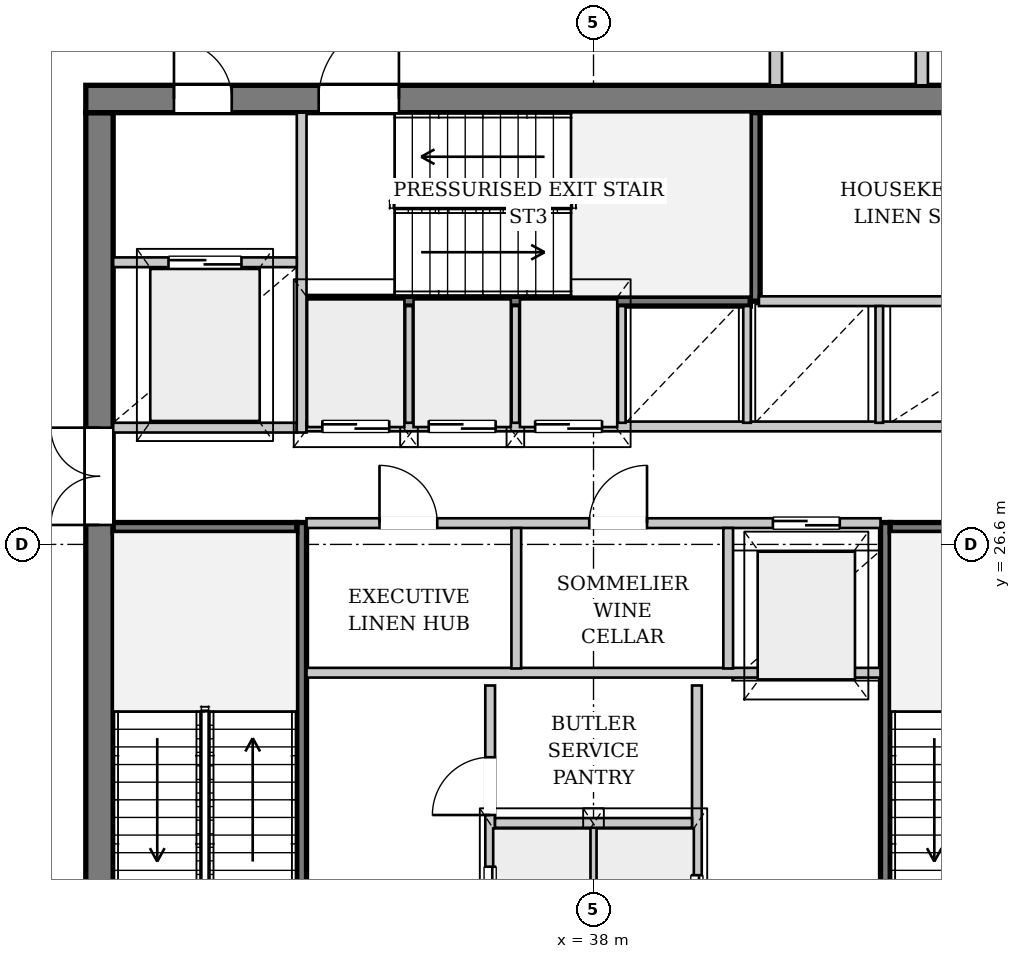
"""IFC4 building model, lengths in metres.
Left out: names, types, materials, properties, quantities, classifications, styles, units other than length and angle.
Written with IfcOpenShell. Run it as: python <this file> out.ifc"""

import sys

from ifc_helpers import new_model, si_unit, direction, frame, frame_2d, origin, place, context, subcontext, project, spatial, rectangle, extrude, source, transform, mapped, element, fill, save


model = new_model("IFC4")
c1 = context("Model", 3, precision=1e-05, world=origin(), true_north=direction((0.0, 1.0)))
c2 = subcontext(c1, "Body", "Model", "MODEL_VIEW")
j1 = project(units=[si_unit("LENGTHUNIT", "METRE"), si_unit("PLANEANGLEUNIT", "RADIAN")], contexts=[c1])
p1 = place(None, origin())
s1 = spatial("IfcSite", under=j1, at=p1, CompositionType="ELEMENT")
p2 = place(p1, origin())
s2 = spatial("IfcBuilding", under=s1, at=p2, CompositionType="ELEMENT")
p3 = place(p2, frame((0.0, 0.0, 216.7)))
s3 = spatial("IfcBuildingStorey", under=s2, at=p3, CompositionType="ELEMENT", Elevation=216.7)
p4 = place(p3, frame((52.937, 23.49, 0.0), z_axis=(0.0, 0.0, 1.0), x_axis=(-0.479001143565, -0.877814276748, 0.0)))
e1 = element("IfcWall", 1, at=p4, inside=s3, PredefinedType="SOLIDWALL", context=c2, shape_type="SweptSolid", body=[
    extrude(rectangle(XDim=23.072, YDim=0.32, at=frame_2d((11.536, 0.0))), origin(), (0.0, 0.0, 1.0), 2.822),
])
p5 = place(p4, frame((6.633, 0.0, 0.0)))
e2 = element("IfcOpeningElement", 2, at=p5, cuts=e1, PredefinedType="OPENING", context=c2, shape_type="SweptSolid", body=[
    extrude(rectangle(XDim=1.5, YDim=2.3, at=frame_2d((0.75, 1.15))), frame((0.0, 0.17, 0.0), z_axis=(0.0, -1.0, 0.0), x_axis=(1.0, 0.0, 0.0)), (0.0, 0.0, 1.0), 0.34),
])
p6 = place(p4, frame((15.773, 0.0, 0.352)))
e3 = element("IfcOpeningElement", 3, at=p6, cuts=e1, PredefinedType="OPENING", context=c2, shape_type="SweptSolid", body=[
    extrude(rectangle(XDim=2.6, YDim=2.35, at=frame_2d((1.3, 1.175))), frame((0.0, 0.17, 0.0), z_axis=(0.0, -1.0, 0.0), x_axis=(1.0, 0.0, 0.0)), (0.0, 0.0, 1.0), 0.34),
])
p7 = place(p3, frame((15.72, 32.197, 0.0), z_axis=(0.0, 0.0, 1.0), x_axis=(0.899012313214, 0.437923350246, 0.0)))
e4 = element("IfcWall", 4, at=p7, inside=s3, PredefinedType="SOLIDWALL", context=c2, shape_type="SweptSolid", body=[
    extrude(rectangle(XDim=22.511, YDim=0.38, at=frame_2d((11.256, 0.0))), origin(), (0.0, 0.0, 1.0), 2.822),
])
p8 = place(p7, frame((5.653, 0.0, 0.452)))
e5 = element("IfcOpeningElement", 5, at=p8, cuts=e4, PredefinedType="OPENING", context=c2, shape_type="SweptSolid", body=[
    extrude(rectangle(XDim=2.2, YDim=2.25, at=frame_2d((1.1, 1.125))), frame((0.0, 0.2, 0.0), z_axis=(0.0, -1.0, 0.0), x_axis=(1.0, 0.0, 0.0)), (0.0, 0.0, 1.0), 0.4),
])
p9 = place(p7, frame((15.108, 0.0, 0.452)))
e6 = element("IfcOpeningElement", 6, at=p9, cuts=e4, PredefinedType="OPENING", context=c2, shape_type="SweptSolid", body=[
    extrude(rectangle(XDim=2.2, YDim=2.25, at=frame_2d((1.1, 1.125))), frame((0.0, 0.2, 0.0), z_axis=(0.0, -1.0, 0.0), x_axis=(1.0, 0.0, 0.0)), (0.0, 0.0, 1.0), 0.4),
])
p10 = place(p3, frame((43.092, 3.473, 0.0), z_axis=(0.0, 0.0, 1.0), x_axis=(0.473808636285, 0.880627830688, 0.0)))
e7 = element("IfcWall", 7, at=p10, inside=s3, PredefinedType="PARAPET", context=c2, shape_type="SweptSolid", body=[
    extrude(rectangle(XDim=20.551, YDim=0.22, at=frame_2d((10.275, 0.0))), origin(), (0.0, 0.0, 1.0), 0.3),
])
p11 = place(p3, frame((29.875, 19.5, 0.0), z_axis=(0.0, 0.0, 1.0), x_axis=(0.0, 1.0, 0.0)))
e8 = element("IfcWall", 8, at=p11, inside=s3, PredefinedType="SHEAR", context=c2, shape_type="SweptSolid", body=[
    extrude(rectangle(XDim=14.2, YDim=0.45, at=frame_2d((7.1, 0.0))), origin(), (0.0, 0.0, 1.0), 3.33),
])
p12 = place(p11, frame((7.42, 0.0, 0.0)))
e9 = element("IfcOpeningElement", 9, at=p12, cuts=e8, PredefinedType="OPENING", context=c2, shape_type="SweptSolid", body=[
    extrude(rectangle(XDim=1.6, YDim=2.2, at=frame_2d((0.8, 1.1))), frame((0.0, 0.235, 0.0), z_axis=(0.0, -1.0, 0.0), x_axis=(1.0, 0.0, 0.0)), (0.0, 0.0, 1.0), 0.47),
])
p13 = place(p3, frame((29.65, 33.925, 0.0), z_axis=(0.0, 0.0, 1.0), x_axis=(1.0, 0.0, 0.0)))
e10 = element("IfcWall", 10, at=p13, inside=s3, PredefinedType="SHEAR", context=c2, shape_type="SweptSolid", body=[
    extrude(rectangle(XDim=16.7, YDim=0.45, at=frame_2d((8.35, 0.0))), origin(), (0.0, 0.0, 1.0), 3.33),
])
p14 = place(p13, frame((1.45, 0.0, 0.0)))
e11 = element("IfcOpeningElement", 11, at=p14, cuts=e10, PredefinedType="OPENING", context=c2, shape_type="SweptSolid", body=[
    extrude(rectangle(XDim=0.95, YDim=2.1, at=frame_2d((0.475, 1.05))), frame((0.0, 0.235, 0.0), z_axis=(0.0, -1.0, 0.0), x_axis=(1.0, 0.0, 0.0)), (0.0, 0.0, 1.0), 0.47),
])
p15 = place(p13, frame((3.83, 0.0, 0.0)))
e12 = element("IfcOpeningElement", 12, at=p15, cuts=e10, PredefinedType="OPENING", context=c2, shape_type="SweptSolid", body=[
    extrude(rectangle(XDim=1.32, YDim=2.2, at=frame_2d((0.66, 1.1))), frame((0.0, 0.235, 0.0), z_axis=(0.0, -1.0, 0.0), x_axis=(1.0, 0.0, 0.0)), (0.0, 0.0, 1.0), 0.47),
])
p16 = place(p3, frame((33.2, 19.5, 0.0), z_axis=(0.0, 0.0, 1.0), x_axis=(0.0, 1.0, 0.0)))
e13 = element("IfcWall", 13, at=p16, inside=s3, PredefinedType="PARTITIONING", context=c2, shape_type="SweptSolid", body=[
    extrude(rectangle(XDim=7.46, YDim=0.16, at=frame_2d((3.73, 0.0))), origin(), (0.0, 0.0, 1.0), 3.33),
])
p17 = place(p16, frame((0.08, 0.0, 0.0)))
e14 = element("IfcOpeningElement", 14, at=p17, cuts=e13, PredefinedType="OPENING", context=c2, shape_type="SweptSolid", body=[
    extrude(rectangle(XDim=1.32, YDim=2.2, at=frame_2d((0.66, 1.1))), frame((0.0, 0.09, 0.0), z_axis=(0.0, -1.0, 0.0), x_axis=(1.0, 0.0, 0.0)), (0.0, 0.0, 1.0), 0.18),
])
p18 = place(p3, frame((30.1, 26.88, 0.0), z_axis=(0.0, 0.0, 1.0), x_axis=(1.0, 0.0, 0.0)))
e15 = element("IfcWall", 15, at=p18, inside=s3, PredefinedType="PARTITIONING", context=c2, shape_type="SweptSolid", body=[
    extrude(rectangle(XDim=3.02, YDim=0.16, at=frame_2d((1.51, 0.0))), origin(), (0.0, 0.0, 1.0), 3.33),
])
p19 = place(p3, frame((42.8, 26.96, 0.0), z_axis=(0.0, 0.0, 1.0), x_axis=(0.0, -1.0, 0.0)))
e16 = element("IfcWall", 16, at=p19, inside=s3, PredefinedType="PARTITIONING", context=c2, shape_type="SweptSolid", body=[
    extrude(rectangle(XDim=7.46, YDim=0.16, at=frame_2d((3.73, 0.0))), origin(), (0.0, 0.0, 1.0), 3.33),
])
p20 = place(p19, frame((6.06, 0.0, 0.0)))
e17 = element("IfcOpeningElement", 17, at=p20, cuts=e16, PredefinedType="OPENING", context=c2, shape_type="SweptSolid", body=[
    extrude(rectangle(XDim=1.32, YDim=2.2, at=frame_2d((0.66, 1.1))), frame((0.0, 0.09, 0.0), z_axis=(0.0, -1.0, 0.0), x_axis=(1.0, 0.0, 0.0)), (0.0, 0.0, 1.0), 0.18),
])
p21 = place(p3, frame((42.88, 26.88, 0.0), z_axis=(0.0, 0.0, 1.0), x_axis=(1.0, 0.0, 0.0)))
e18 = element("IfcWall", 18, at=p21, inside=s3, PredefinedType="PARTITIONING", context=c2, shape_type="SweptSolid", body=[
    extrude(rectangle(XDim=3.02, YDim=0.16, at=frame_2d((1.51, 0.0))), origin(), (0.0, 0.0, 1.0), 3.33),
])
p22 = place(p3, frame((33.28, 30.6, 0.0), z_axis=(0.0, 0.0, 1.0), x_axis=(1.0, 0.0, 0.0)))
e19 = element("IfcWall", 19, at=p22, inside=s3, PredefinedType="PARTITIONING", context=c2, shape_type="SweptSolid", body=[
    extrude(rectangle(XDim=7.3, YDim=0.16, at=frame_2d((3.65, 0.0))), origin(), (0.0, 0.0, 1.0), 3.33),
])
p23 = place(p3, frame((40.66, 30.6, 0.0), z_axis=(0.0, 0.0, 1.0), x_axis=(0.0, 1.0, 0.0)))
e20 = element("IfcWall", 20, at=p23, inside=s3, PredefinedType="PARTITIONING", context=c2, shape_type="SweptSolid", body=[
    extrude(rectangle(XDim=3.1, YDim=0.16, at=frame_2d((1.55, 0.0))), origin(), (0.0, 0.0, 1.0), 3.33),
])
p24 = place(p3, frame((36.3, 19.5, 0.0), z_axis=(0.0, 0.0, 1.0), x_axis=(0.0, 1.0, 0.0)))
e21 = element("IfcWall", 21, at=p24, inside=s3, PredefinedType="PARTITIONING", context=c2, shape_type="SweptSolid", body=[
    extrude(rectangle(XDim=4.78, YDim=0.16, at=frame_2d((2.39, 0.0))), origin(), (0.0, 0.0, 1.0), 3.33),
])
p25 = place(p24, frame((0.6, 0.0, 0.0)))
e22 = element("IfcOpeningElement", 22, at=p25, cuts=e21, PredefinedType="OPENING", context=c2, shape_type="SweptSolid", body=[
    extrude(rectangle(XDim=1.2, YDim=2.2, at=frame_2d((0.6, 1.1))), frame((0.0, 0.09, 0.0), z_axis=(0.0, -1.0, 0.0), x_axis=(1.0, 0.0, 0.0)), (0.0, 0.0, 1.0), 0.18),
])
p26 = place(p24, frame((2.65, 0.0, 0.0)))
e23 = element("IfcOpeningElement", 23, at=p26, cuts=e21, PredefinedType="OPENING", context=c2, shape_type="SweptSolid", body=[
    extrude(rectangle(XDim=0.95, YDim=2.1, at=frame_2d((0.475, 1.05))), frame((0.0, 0.09, 0.0), z_axis=(0.0, -1.0, 0.0), x_axis=(1.0, 0.0, 0.0)), (0.0, 0.0, 1.0), 0.18),
])
p27 = place(p3, frame((39.7, 24.28, 0.0), z_axis=(0.0, 0.0, 1.0), x_axis=(0.0, -1.0, 0.0)))
e24 = element("IfcWall", 24, at=p27, inside=s3, PredefinedType="PARTITIONING", context=c2, shape_type="SweptSolid", body=[
    extrude(rectangle(XDim=4.78, YDim=0.16, at=frame_2d((2.39, 0.0))), origin(), (0.0, 0.0, 1.0), 3.33),
])
p28 = place(p27, frame((3.12, 0.0, 0.0)))
e25 = element("IfcOpeningElement", 25, at=p28, cuts=e24, PredefinedType="OPENING", context=c2, shape_type="SweptSolid", body=[
    extrude(rectangle(XDim=1.2, YDim=2.2, at=frame_2d((0.6, 1.1))), frame((0.0, 0.09, 0.0), z_axis=(0.0, -1.0, 0.0), x_axis=(1.0, 0.0, 0.0)), (0.0, 0.0, 1.0), 0.18),
])
p29 = place(p3, frame((38.0, 19.5, 0.0), z_axis=(0.0, 0.0, 1.0), x_axis=(0.0, 1.0, 0.0)))
e26 = element("IfcWall", 26, at=p29, inside=s3, PredefinedType="PARTITIONING", context=c2, shape_type="SweptSolid", body=[
    extrude(rectangle(XDim=2.46, YDim=0.125, at=frame_2d((1.23, 0.0))), origin(), (0.0, 0.0, 1.0), 3.33),
])
p30 = place(p3, frame((36.38, 22.02, 0.0), z_axis=(0.0, 0.0, 1.0), x_axis=(1.0, 0.0, 0.0)))
e27 = element("IfcWall", 27, at=p30, inside=s3, PredefinedType="PARTITIONING", context=c2, shape_type="SweptSolid", body=[
    extrude(rectangle(XDim=3.24, YDim=0.16, at=frame_2d((1.62, 0.0))), origin(), (0.0, 0.0, 1.0), 3.33),
])
p31 = place(p3, frame((33.28, 24.49, 0.0), z_axis=(0.0, 0.0, 1.0), x_axis=(1.0, 0.0, 0.0)))
e28 = element("IfcWall", 28, at=p31, inside=s3, PredefinedType="PARTITIONING", context=c2, shape_type="SweptSolid", body=[
    extrude(rectangle(XDim=9.44, YDim=0.16, at=frame_2d((4.72, 0.0))), origin(), (0.0, 0.0, 1.0), 3.33),
])
p32 = place(p3, frame((30.1, 28.52, 0.0), z_axis=(0.0, 0.0, 1.0), x_axis=(1.0, 0.0, 0.0)))
e29 = element("IfcWall", 29, at=p32, inside=s3, PredefinedType="PARTITIONING", context=c2, shape_type="SweptSolid", body=[
    extrude(rectangle(XDim=3.02, YDim=0.16, at=frame_2d((1.51, 0.0))), origin(), (0.0, 0.0, 1.0), 3.33),
])
p33 = place(p3, frame((33.2, 28.44, 0.0), z_axis=(0.0, 0.0, 1.0), x_axis=(0.0, 1.0, 0.0)))
e30 = element("IfcWall", 30, at=p33, inside=s3, PredefinedType="PARTITIONING", context=c2, shape_type="SweptSolid", body=[
    extrude(rectangle(XDim=5.26, YDim=0.16, at=frame_2d((2.63, 0.0))), origin(), (0.0, 0.0, 1.0), 3.33),
])
p34 = place(p3, frame((30.1, 31.24, 0.0), z_axis=(0.0, 0.0, 1.0), x_axis=(1.0, 0.0, 0.0)))
e31 = element("IfcWall", 31, at=p34, inside=s3, PredefinedType="PARTITIONING", context=c2, shape_type="SweptSolid", body=[
    extrude(rectangle(XDim=3.02, YDim=0.16, at=frame_2d((1.51, 0.0))), origin(), (0.0, 0.0, 1.0), 3.33),
])
p35 = place(p34, frame((0.91, 0.0, 0.0)))
e32 = element("IfcOpeningElement", 32, at=p35, cuts=e31, PredefinedType="OPENING", context=c2, shape_type="SweptSolid", body=[
    extrude(rectangle(XDim=1.2, YDim=2.2, at=frame_2d((0.6, 1.1))), frame((0.0, 0.09, 0.0), z_axis=(0.0, -1.0, 0.0), x_axis=(1.0, 0.0, 0.0)), (0.0, 0.0, 1.0), 0.18),
])
p36 = place(p3, frame((33.28, 26.95, 0.0), z_axis=(0.0, 0.0, 1.0), x_axis=(1.0, 0.0, 0.0)))
e33 = element("IfcWall", 33, at=p36, inside=s3, PredefinedType="PARTITIONING", context=c2, shape_type="SweptSolid", body=[
    extrude(rectangle(XDim=9.44, YDim=0.16, at=frame_2d((4.72, 0.0))), origin(), (0.0, 0.0, 1.0), 3.33),
])
p37 = place(p36, frame((1.2, 0.0, 0.0)))
e34 = element("IfcOpeningElement", 34, at=p37, cuts=e33, PredefinedType="OPENING", context=c2, shape_type="SweptSolid", body=[
    extrude(rectangle(XDim=0.95, YDim=2.1, at=frame_2d((0.475, 1.05))), frame((0.0, 0.09, 0.0), z_axis=(0.0, -1.0, 0.0), x_axis=(1.0, 0.0, 0.0)), (0.0, 0.0, 1.0), 0.18),
])
p38 = place(p36, frame((4.65, 0.0, 0.0)))
e35 = element("IfcOpeningElement", 35, at=p38, cuts=e33, PredefinedType="OPENING", context=c2, shape_type="SweptSolid", body=[
    extrude(rectangle(XDim=0.95, YDim=2.1, at=frame_2d((0.475, 1.05))), frame((0.0, 0.09, 0.0), z_axis=(0.0, -1.0, 0.0), x_axis=(1.0, 0.0, 0.0)), (0.0, 0.0, 1.0), 0.18),
])
p39 = place(p36, frame((7.67, 0.0, 0.0)))
e36 = element("IfcOpeningElement", 36, at=p39, cuts=e33, PredefinedType="OPENING", context=c2, shape_type="SweptSolid", body=[
    extrude(rectangle(XDim=1.1, YDim=2.2, at=frame_2d((0.55, 1.1))), frame((0.0, 0.09, 0.0), z_axis=(0.0, -1.0, 0.0), x_axis=(1.0, 0.0, 0.0)), (0.0, 0.0, 1.0), 0.18),
])
for number, where, z_axis, x_axis in (
    (37, (36.73, 24.56, 0.0), (0.0, 0.0, 1.0), (0.0, 1.0, 0.0)),
    (38, (40.215, 24.56, 0.0), (0.0, 0.0, 1.0), (0.0, 1.0, 0.0)),
):
    element("IfcWall", number, at=place(p3, frame(where, z_axis=z_axis, x_axis=x_axis)), inside=s3, PredefinedType="PARTITIONING", context=c2, shape_type="SweptSolid", body=[
        extrude(rectangle(XDim=2.31, YDim=0.16, at=frame_2d((1.155, 0.0))), origin(), (0.0, 0.0, 1.0), 3.33),
    ])
p40 = place(p3, frame((33.28, 28.54, 0.0), z_axis=(0.0, 0.0, 1.0), x_axis=(1.0, 0.0, 0.0)))
e39 = element("IfcWall", 39, at=p40, inside=s3, PredefinedType="PARTITIONING", context=c2, shape_type="SweptSolid", body=[
    extrude(rectangle(XDim=12.62, YDim=0.16, at=frame_2d((6.31, 0.0))), origin(), (0.0, 0.0, 1.0), 3.33),
])
p41 = place(p40, frame((0.26, 0.0, 0.0)))
e40 = element("IfcOpeningElement", 40, at=p41, cuts=e39, PredefinedType="OPENING", context=c2, shape_type="SweptSolid", body=[
    extrude(rectangle(XDim=1.1, YDim=2.2, at=frame_2d((0.55, 1.1))), frame((0.0, 0.09, 0.0), z_axis=(0.0, -1.0, 0.0), x_axis=(1.0, 0.0, 0.0)), (0.0, 0.0, 1.0), 0.18),
])
p42 = place(p40, frame((2.01, 0.0, 0.0)))
e41 = element("IfcOpeningElement", 41, at=p42, cuts=e39, PredefinedType="OPENING", context=c2, shape_type="SweptSolid", body=[
    extrude(rectangle(XDim=1.1, YDim=2.2, at=frame_2d((0.55, 1.1))), frame((0.0, 0.09, 0.0), z_axis=(0.0, -1.0, 0.0), x_axis=(1.0, 0.0, 0.0)), (0.0, 0.0, 1.0), 0.18),
])
p43 = place(p40, frame((3.76, 0.0, 0.0)))
e42 = element("IfcOpeningElement", 42, at=p43, cuts=e39, PredefinedType="OPENING", context=c2, shape_type="SweptSolid", body=[
    extrude(rectangle(XDim=1.1, YDim=2.2, at=frame_2d((0.55, 1.1))), frame((0.0, 0.09, 0.0), z_axis=(0.0, -1.0, 0.0), x_axis=(1.0, 0.0, 0.0)), (0.0, 0.0, 1.0), 0.18),
])
p44 = place(p3, frame((40.72, 30.6, 0.0), z_axis=(0.0, 0.0, 1.0), x_axis=(1.0, 0.0, 0.0)))
e43 = element("IfcWall", 43, at=p44, inside=s3, PredefinedType="PARTITIONING", context=c2, shape_type="SweptSolid", body=[
    extrude(rectangle(XDim=5.18, YDim=0.16, at=frame_2d((2.59, 0.0))), origin(), (0.0, 0.0, 1.0), 3.33),
])
for number, where, z_axis, x_axis in (
    (44, (34.965, 28.6, 0.0), (0.0, 0.0, 1.0), (0.0, 1.0, 0.0)),
    (45, (36.715, 28.6, 0.0), (0.0, 0.0, 1.0), (0.0, 1.0, 0.0)),
    (46, (38.465, 28.6, 0.0), (0.0, 0.0, 1.0), (0.0, 1.0, 0.0)),
    (47, (40.525, 28.6, 0.0), (0.0, 0.0, 1.0), (0.0, 1.0, 0.0)),
    (48, (42.7, 28.6, 0.0), (0.0, 0.0, 1.0), (0.0, 1.0, 0.0)),
):
    element("IfcWall", number, at=place(p3, frame(where, z_axis=z_axis, x_axis=x_axis)), inside=s3, PredefinedType="PARTITIONING", context=c2, shape_type="SweptSolid", body=[
        extrude(rectangle(XDim=1.92, YDim=0.125, at=frame_2d((0.96, 0.0))), origin(), (0.0, 0.0, 1.0), 3.33),
    ])
for number, where, z_axis, x_axis in (
    (49, (41.0, 34.15, 0.0), (0.0, 0.0, 1.0), (0.0, 1.0, 0.0)),
    (50, (43.4, 34.15, 0.0), (0.0, 0.0, 1.0), (0.0, 1.0, 0.0)),
):
    element("IfcWall", number, at=place(p3, frame(where, z_axis=z_axis, x_axis=x_axis)), inside=s3, PredefinedType="PARTITIONING", context=c2, shape_type="SweptSolid", body=[
        extrude(rectangle(XDim=1.85, YDim=0.2, at=frame_2d((0.925, 0.0))), origin(), (0.0, 0.0, 1.0), 3.33),
    ])
m1 = source(origin(), c2, "Body", "SweptSolid", [
    extrude(rectangle(XDim=1.6, YDim=2.2, at=frame_2d((0.8, 1.1))), frame((0.0, 0.025, 0.0), z_axis=(0.0, -1.0, 0.0), x_axis=(1.0, 0.0, 0.0)), (0.0, 0.0, 1.0), 0.05),
])
p45 = place(p12, origin())
e51 = element("IfcDoor", 51, at=p45, inside=s3, OperationType="DOUBLE_DOOR_SINGLE_SWING", PredefinedType="DOOR", context=c2, shape_type="MappedRepresentation", body=[
    mapped(m1, transform((0.0, 0.0, 0.0), x_axis=(1.0, 0.0, 0.0), y_axis=(0.0, 1.0, 0.0), z_axis=(0.0, 0.0, 1.0), scale=1.0)),
])
fill(e9, e51)
m2 = source(origin(), c2, "Body", "SweptSolid", [
    extrude(rectangle(XDim=0.95, YDim=2.1, at=frame_2d((0.475, 1.05))), frame((0.0, 0.025, 0.0), z_axis=(0.0, -1.0, 0.0), x_axis=(1.0, 0.0, 0.0)), (0.0, 0.0, 1.0), 0.05),
])
p46 = place(p14, origin())
e52 = element("IfcDoor", 52, at=p46, inside=s3, OperationType="SINGLE_SWING_LEFT", PredefinedType="DOOR", context=c2, shape_type="MappedRepresentation", body=[
    mapped(m2, transform((0.0, 0.0, 0.0), x_axis=(1.0, 0.0, 0.0), y_axis=(0.0, 1.0, 0.0), z_axis=(0.0, 0.0, 1.0), scale=1.0)),
])
fill(e11, e52)
m3 = source(origin(), c2, "Body", "SweptSolid", [
    extrude(rectangle(XDim=1.32, YDim=2.2, at=frame_2d((0.66, 1.1))), frame((0.0, 0.025, 0.0), z_axis=(0.0, -1.0, 0.0), x_axis=(1.0, 0.0, 0.0)), (0.0, 0.0, 1.0), 0.05),
])
p47 = place(p15, origin())
e53 = element("IfcDoor", 53, at=p47, inside=s3, OperationType="SINGLE_SWING_RIGHT", PredefinedType="DOOR", context=c2, shape_type="MappedRepresentation", body=[
    mapped(m3, transform((0.0, 0.0, 0.0), x_axis=(1.0, 0.0, 0.0), y_axis=(0.0, 1.0, 0.0), z_axis=(0.0, 0.0, 1.0), scale=1.0)),
])
fill(e12, e53)
m4 = source(origin(), c2, "Body", "SweptSolid", [
    extrude(rectangle(XDim=1.2, YDim=2.2, at=frame_2d((0.6, 1.1))), frame((0.0, 0.025, 0.0), z_axis=(0.0, -1.0, 0.0), x_axis=(1.0, 0.0, 0.0)), (0.0, 0.0, 1.0), 0.05),
])
p48 = place(p25, origin())
e54 = element("IfcDoor", 54, at=p48, inside=s3, OperationType="DOUBLE_DOOR_SLIDING", PredefinedType="DOOR", context=c2, shape_type="MappedRepresentation", body=[
    mapped(m4, transform((0.0, 0.0, 0.0), x_axis=(1.0, 0.0, 0.0), y_axis=(0.0, 1.0, 0.0), z_axis=(0.0, 0.0, 1.0), scale=1.0)),
])
fill(e22, e54)
p49 = place(p26, origin())
e55 = element("IfcDoor", 55, at=p49, inside=s3, OperationType="SINGLE_SWING_LEFT", PredefinedType="DOOR", context=c2, shape_type="MappedRepresentation", body=[
    mapped(m2, transform((0.0, 0.0, 0.0), x_axis=(1.0, 0.0, 0.0), y_axis=(0.0, 1.0, 0.0), z_axis=(0.0, 0.0, 1.0), scale=1.0)),
])
fill(e23, e55)
p50 = place(p28, origin())
e56 = element("IfcDoor", 56, at=p50, inside=s3, OperationType="DOUBLE_DOOR_SLIDING", PredefinedType="DOOR", context=c2, shape_type="MappedRepresentation", body=[
    mapped(m4, transform((0.0, 0.0, 0.0), x_axis=(1.0, 0.0, 0.0), y_axis=(0.0, 1.0, 0.0), z_axis=(0.0, 0.0, 1.0), scale=1.0)),
])
fill(e25, e56)
p51 = place(p35, origin())
e57 = element("IfcDoor", 57, at=p51, inside=s3, OperationType="DOUBLE_DOOR_SLIDING", PredefinedType="DOOR", context=c2, shape_type="MappedRepresentation", body=[
    mapped(m4, transform((0.0, 0.0, 0.0), x_axis=(1.0, 0.0, 0.0), y_axis=(0.0, 1.0, 0.0), z_axis=(0.0, 0.0, 1.0), scale=1.0)),
])
fill(e32, e57)
p52 = place(p37, origin())
e58 = element("IfcDoor", 58, at=p52, inside=s3, OperationType="SINGLE_SWING_LEFT", PredefinedType="DOOR", context=c2, shape_type="MappedRepresentation", body=[
    mapped(m2, transform((0.0, 0.0, 0.0), x_axis=(1.0, 0.0, 0.0), y_axis=(0.0, 1.0, 0.0), z_axis=(0.0, 0.0, 1.0), scale=1.0)),
])
fill(e34, e58)
p53 = place(p38, origin())
e59 = element("IfcDoor", 59, at=p53, inside=s3, OperationType="SINGLE_SWING_RIGHT", PredefinedType="DOOR", context=c2, shape_type="MappedRepresentation", body=[
    mapped(m2, transform((0.0, 0.0, 0.0), x_axis=(1.0, 0.0, 0.0), y_axis=(0.0, 1.0, 0.0), z_axis=(0.0, 0.0, 1.0), scale=1.0)),
])
fill(e35, e59)
m5 = source(origin(), c2, "Body", "SweptSolid", [
    extrude(rectangle(XDim=1.1, YDim=2.2, at=frame_2d((0.55, 1.1))), frame((0.0, 0.025, 0.0), z_axis=(0.0, -1.0, 0.0), x_axis=(1.0, 0.0, 0.0)), (0.0, 0.0, 1.0), 0.05),
])
p54 = place(p39, origin())
e60 = element("IfcDoor", 60, at=p54, inside=s3, OperationType="DOUBLE_DOOR_SLIDING", PredefinedType="DOOR", context=c2, shape_type="MappedRepresentation", body=[
    mapped(m5, transform((0.0, 0.0, 0.0), x_axis=(1.0, 0.0, 0.0), y_axis=(0.0, 1.0, 0.0), z_axis=(0.0, 0.0, 1.0), scale=1.0)),
])
fill(e36, e60)
p55 = place(p41, origin())
e61 = element("IfcDoor", 61, at=p55, inside=s3, OperationType="DOUBLE_DOOR_SLIDING", PredefinedType="DOOR", context=c2, shape_type="MappedRepresentation", body=[
    mapped(m5, transform((0.0, 0.0, 0.0), x_axis=(1.0, 0.0, 0.0), y_axis=(0.0, 1.0, 0.0), z_axis=(0.0, 0.0, 1.0), scale=1.0)),
])
fill(e40, e61)
p56 = place(p42, origin())
e62 = element("IfcDoor", 62, at=p56, inside=s3, OperationType="DOUBLE_DOOR_SLIDING", PredefinedType="DOOR", context=c2, shape_type="MappedRepresentation", body=[
    mapped(m5, transform((0.0, 0.0, 0.0), x_axis=(1.0, 0.0, 0.0), y_axis=(0.0, 1.0, 0.0), z_axis=(0.0, 0.0, 1.0), scale=1.0)),
])
fill(e41, e62)
p57 = place(p43, origin())
e63 = element("IfcDoor", 63, at=p57, inside=s3, OperationType="DOUBLE_DOOR_SLIDING", PredefinedType="DOOR", context=c2, shape_type="MappedRepresentation", body=[
    mapped(m5, transform((0.0, 0.0, 0.0), x_axis=(1.0, 0.0, 0.0), y_axis=(0.0, 1.0, 0.0), z_axis=(0.0, 0.0, 1.0), scale=1.0)),
])
fill(e42, e63)
save(model, sys.argv[1])
